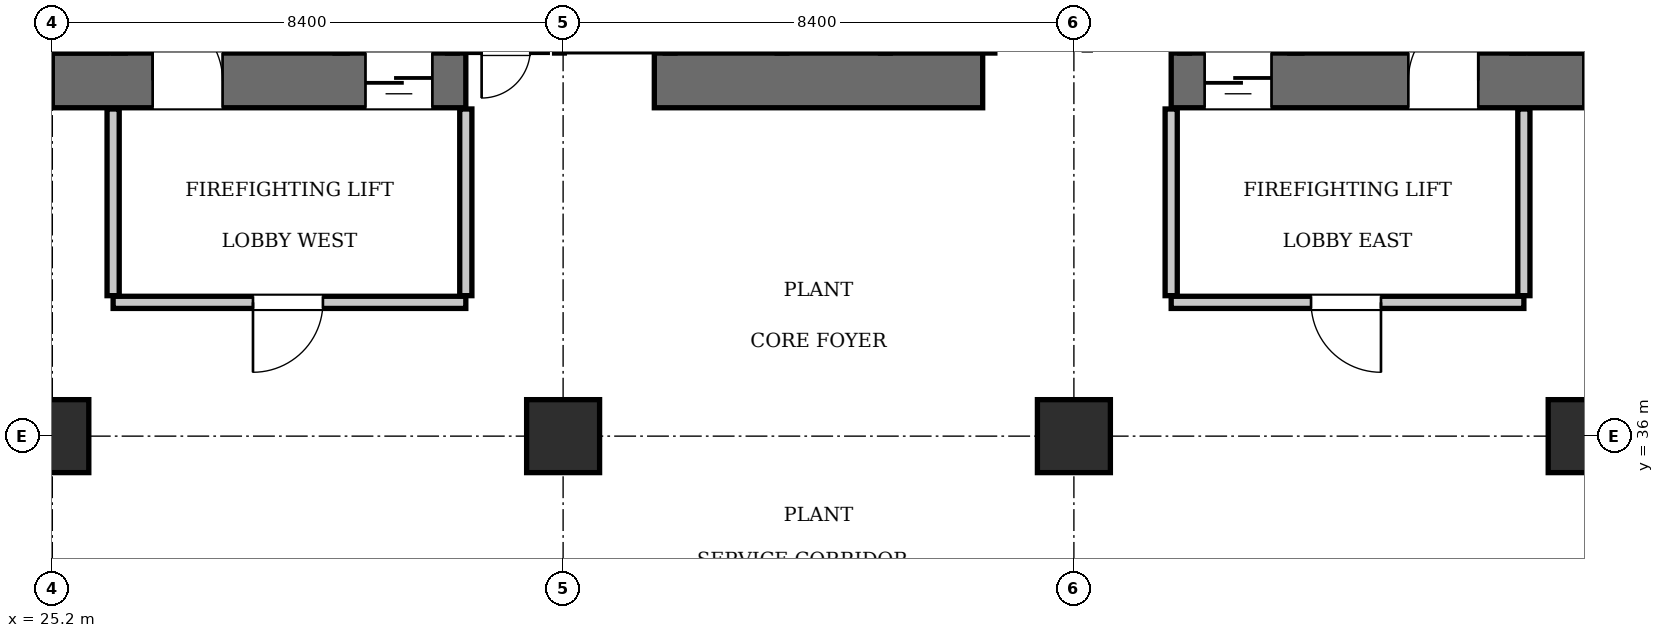
"""IFC4 building model, lengths in metres.
Left out: names, types, materials, properties, quantities, classifications, styles, units other than length and angle.
Written with IfcOpenShell. Run it as: python <this file> out.ifc"""

import sys

from ifc_helpers import new_model, si_unit, direction, frame, frame_2d, origin, origin_2d, place, context, subcontext, project, spatial, rectangle, extrude, element, fill, save


model = new_model("IFC4")
c1 = context("Model", 3, precision=1e-05, world=origin(), true_north=direction((0.0, 1.0)))
c2 = subcontext(c1, "Body", "Model", "MODEL_VIEW")
j1 = project(units=[si_unit("LENGTHUNIT", "METRE"), si_unit("PLANEANGLEUNIT", "RADIAN")], contexts=[c1])
p1 = place(None, origin())
s1 = spatial("IfcSite", under=j1, at=p1, CompositionType="ELEMENT")
p2 = place(p1, origin())
s2 = spatial("IfcBuilding", under=s1, at=p2, CompositionType="ELEMENT")
p3 = place(p2, frame((0.0, 0.0, 21.35)))
s3 = spatial("IfcBuildingStorey", under=s2, at=p3, CompositionType="ELEMENT", Elevation=21.35)
p4 = place(p3, frame((25.2, 41.85, 0.0), z_axis=(0.0, 0.0, 1.0), x_axis=(1.0, 0.0, 0.0)))
e1 = element("IfcWall", 1, at=p4, inside=s3, PredefinedType="SHEAR", context=c2, shape_type="SweptSolid", body=[
    extrude(rectangle(XDim=6.8, YDim=0.9, at=frame_2d((3.4, 0.0))), origin(), (0.0, 0.0, 1.0), 5.6),
])
p5 = place(p4, frame((1.65, 0.0, 0.0)))
e2 = element("IfcOpeningElement", 2, at=p5, cuts=e1, PredefinedType="OPENING", context=c2, shape_type="SweptSolid", body=[
    extrude(rectangle(XDim=1.15, YDim=2.15, at=frame_2d((0.575, 1.075))), frame((0.0, 0.46, 0.0), z_axis=(0.0, -1.0, 0.0), x_axis=(1.0, 0.0, 0.0)), (0.0, 0.0, 1.0), 0.92),
])
p6 = place(p4, frame((5.15, 0.0, 0.0)))
e3 = element("IfcOpeningElement", 3, at=p6, cuts=e1, PredefinedType="OPENING", context=c2, shape_type="SweptSolid", body=[
    extrude(rectangle(XDim=1.1, YDim=2.2, at=frame_2d((0.55, 1.1))), frame((0.0, 0.46, 0.0), z_axis=(0.0, -1.0, 0.0), x_axis=(1.0, 0.0, 0.0)), (0.0, 0.0, 1.0), 0.92),
])
p7 = place(p3, frame((35.1, 41.85, 0.0), z_axis=(0.0, 0.0, 1.0), x_axis=(1.0, 0.0, 0.0)))
e4 = element("IfcWall", 4, at=p7, inside=s3, PredefinedType="SHEAR", context=c2, shape_type="SweptSolid", body=[
    extrude(rectangle(XDim=5.4, YDim=0.9, at=frame_2d((2.7, 0.0))), origin(), (0.0, 0.0, 1.0), 5.6),
])
p8 = place(p3, frame((43.6, 41.85, 0.0), z_axis=(0.0, 0.0, 1.0), x_axis=(1.0, 0.0, 0.0)))
e5 = element("IfcWall", 5, at=p8, inside=s3, PredefinedType="SHEAR", context=c2, shape_type="SweptSolid", body=[
    extrude(rectangle(XDim=6.8, YDim=0.9, at=frame_2d((3.4, 0.0))), origin(), (0.0, 0.0, 1.0), 5.6),
])
p9 = place(p8, frame((3.9, 0.0, 0.0)))
e6 = element("IfcOpeningElement", 6, at=p9, cuts=e5, PredefinedType="OPENING", context=c2, shape_type="SweptSolid", body=[
    extrude(rectangle(XDim=1.15, YDim=2.15, at=frame_2d((0.575, 1.075))), frame((0.0, 0.46, 0.0), z_axis=(0.0, -1.0, 0.0), x_axis=(1.0, 0.0, 0.0)), (0.0, 0.0, 1.0), 0.92),
])
p10 = place(p8, frame((0.55, 0.0, 0.0)))
e7 = element("IfcOpeningElement", 7, at=p10, cuts=e5, PredefinedType="OPENING", context=c2, shape_type="SweptSolid", body=[
    extrude(rectangle(XDim=1.1, YDim=2.2, at=frame_2d((0.55, 1.1))), frame((0.0, 0.46, 0.0), z_axis=(0.0, -1.0, 0.0), x_axis=(1.0, 0.0, 0.0)), (0.0, 0.0, 1.0), 0.92),
])
for number, where, z_axis, x_axis in (
    (8, (25.65, 42.3, 0.0), (0.0, 0.0, 1.0), (0.0, 1.0, 0.0)),
    (9, (49.95, 42.3, 0.0), (0.0, 0.0, 1.0), (0.0, 1.0, 0.0)),
):
    element("IfcWall", number, at=place(p3, frame(where, z_axis=z_axis, x_axis=x_axis)), inside=s3, PredefinedType="SHEAR", context=c2, shape_type="SweptSolid", body=[
        extrude(rectangle(XDim=1.6, YDim=0.9, at=frame_2d((0.8, 0.0))), origin(), (0.0, 0.0, 1.0), 5.6),
    ])
for number, where, z_axis, x_axis in (
    (10, (25.2, 36.0, 0.0), (0.0, 0.0, 1.0), (1.0, 0.0, 0.0)),
    (11, (33.6, 36.0, 0.0), (0.0, 0.0, 1.0), (1.0, 0.0, 0.0)),
    (12, (42.0, 36.0, 0.0), (0.0, 0.0, 1.0), (1.0, 0.0, 0.0)),
    (13, (50.4, 36.0, 0.0), (0.0, 0.0, 1.0), (1.0, 0.0, 0.0)),
):
    element("IfcColumn", number, at=place(p3, frame(where, z_axis=z_axis, x_axis=x_axis)), inside=s3, PredefinedType="COLUMN", context=c2, shape_type="SweptSolid", body=[
        extrude(rectangle(XDim=1.2, YDim=1.2, at=origin_2d()), origin(), (0.0, 0.0, 1.0), 5.6),
    ])
p11 = place(p3, frame((29.95, 42.3, 0.0), z_axis=(0.0, 0.0, 1.0), x_axis=(0.0, 1.0, 0.0)))
e14 = element("IfcWall", 14, at=p11, inside=s3, PredefinedType="SOLIDWALL", context=c2, shape_type="SweptSolid", body=[
    extrude(rectangle(XDim=8.85, YDim=0.2, at=frame_2d((4.425, 0.0))), origin(), (0.0, 0.0, 1.0), 5.36),
])
p12 = place(p3, frame((26.3, 42.3, 0.0), z_axis=(0.0, 0.0, 1.0), x_axis=(0.0, 1.0, 0.0)))
e15 = element("IfcWall", 15, at=p12, inside=s3, PredefinedType="SOLIDWALL", context=c2, shape_type="SweptSolid", body=[
    extrude(rectangle(XDim=1.58, YDim=0.2, at=frame_2d((0.79, 0.0))), origin(), (0.0, 0.0, 1.0), 5.36),
])
p13 = place(p3, frame((45.65, 42.3, 0.0), z_axis=(0.0, 0.0, 1.0), x_axis=(0.0, 1.0, 0.0)))
e16 = element("IfcWall", 16, at=p13, inside=s3, PredefinedType="SOLIDWALL", context=c2, shape_type="SweptSolid", body=[
    extrude(rectangle(XDim=8.85, YDim=0.2, at=frame_2d((4.425, 0.0))), origin(), (0.0, 0.0, 1.0), 5.36),
])
p14 = place(p3, frame((49.3, 42.3, 0.0), z_axis=(0.0, 0.0, 1.0), x_axis=(0.0, 1.0, 0.0)))
e17 = element("IfcWall", 17, at=p14, inside=s3, PredefinedType="SOLIDWALL", context=c2, shape_type="SweptSolid", body=[
    extrude(rectangle(XDim=1.58, YDim=0.2, at=frame_2d((0.79, 0.0))), origin(), (0.0, 0.0, 1.0), 5.36),
])
for number, where, z_axis, x_axis in (
    (18, (31.78, 42.3, 0.0), (0.0, 0.0, 1.0), (0.0, 1.0, 0.0)),
    (19, (43.82, 42.3, 0.0), (0.0, 0.0, 1.0), (0.0, 1.0, 0.0)),
):
    element("IfcWall", number, at=place(p3, frame(where, z_axis=z_axis, x_axis=x_axis)), inside=s3, PredefinedType="SOLIDWALL", context=c2, shape_type="SweptSolid", body=[
        extrude(rectangle(XDim=2.44, YDim=0.16, at=frame_2d((1.22, 0.0))), origin(), (0.0, 0.0, 1.0), 5.36),
    ])
for number, where, z_axis, x_axis in (
    (20, (37.2, 42.3, 0.0), (0.0, 0.0, 1.0), (0.0, 1.0, 0.0)),
    (21, (38.9, 42.3, 0.0), (0.0, 0.0, 1.0), (0.0, 1.0, 0.0)),
    (22, (40.62, 42.3, 0.0), (0.0, 0.0, 1.0), (0.0, 1.0, 0.0)),
):
    element("IfcWall", number, at=place(p3, frame(where, z_axis=z_axis, x_axis=x_axis)), inside=s3, PredefinedType="SOLIDWALL", context=c2, shape_type="SweptSolid", body=[
        extrude(rectangle(XDim=2.05, YDim=0.16, at=frame_2d((1.025, 0.0))), origin(), (0.0, 0.0, 1.0), 5.36),
    ])
for number, where, z_axis, x_axis in (
    (23, (33.54, 42.3, 0.0), (0.0, 0.0, 1.0), (0.0, 1.0, 0.0)),
    (24, (35.36, 42.3, 0.0), (0.0, 0.0, 1.0), (0.0, 1.0, 0.0)),
):
    element("IfcWall", number, at=place(p3, frame(where, z_axis=z_axis, x_axis=x_axis)), inside=s3, PredefinedType="SOLIDWALL", context=c2, shape_type="SweptSolid", body=[
        extrude(rectangle(XDim=2.1, YDim=0.16, at=frame_2d((1.05, 0.0))), origin(), (0.0, 0.0, 1.0), 5.36),
    ])
p15 = place(p3, frame((33.62, 42.4, 0.0), z_axis=(0.0, 0.0, 1.0), x_axis=(1.0, 0.0, 0.0)))
e25 = element("IfcWall", 25, at=p15, inside=s3, PredefinedType="SOLIDWALL", context=c2, shape_type="SweptSolid", body=[
    extrude(rectangle(XDim=1.66, YDim=0.16, at=frame_2d((0.83, 0.0))), origin(), (0.0, 0.0, 1.0), 5.36),
])
p16 = place(p3, frame((26.2, 38.2, 0.0), z_axis=(0.0, 0.0, 1.0), x_axis=(1.0, 0.0, 0.0)))
e26 = element("IfcWall", 26, at=p16, inside=s3, PredefinedType="PARTITIONING", context=c2, shape_type="SweptSolid", body=[
    extrude(rectangle(XDim=5.8, YDim=0.2, at=frame_2d((2.9, 0.0))), origin(), (0.0, 0.0, 1.0), 5.36),
])
p17 = place(p16, frame((2.3, 0.0, 0.0)))
e27 = element("IfcOpeningElement", 27, at=p17, cuts=e26, PredefinedType="OPENING", context=c2, shape_type="SweptSolid", body=[
    extrude(rectangle(XDim=1.15, YDim=2.15, at=frame_2d((0.575, 1.075))), frame((0.0, 0.11, 0.0), z_axis=(0.0, -1.0, 0.0), x_axis=(1.0, 0.0, 0.0)), (0.0, 0.0, 1.0), 0.22),
])
for number, where, z_axis, x_axis in (
    (28, (26.2, 38.31, 0.0), (0.0, 0.0, 1.0), (0.0, 1.0, 0.0)),
    (29, (32.0, 38.31, 0.0), (0.0, 0.0, 1.0), (0.0, 1.0, 0.0)),
):
    element("IfcWall", number, at=place(p3, frame(where, z_axis=z_axis, x_axis=x_axis)), inside=s3, PredefinedType="PARTITIONING", context=c2, shape_type="SweptSolid", body=[
        extrude(rectangle(XDim=3.07, YDim=0.2, at=frame_2d((1.535, 0.0))), origin(), (0.0, 0.0, 1.0), 5.36),
    ])
p18 = place(p3, frame((43.6, 38.2, 0.0), z_axis=(0.0, 0.0, 1.0), x_axis=(1.0, 0.0, 0.0)))
e30 = element("IfcWall", 30, at=p18, inside=s3, PredefinedType="PARTITIONING", context=c2, shape_type="SweptSolid", body=[
    extrude(rectangle(XDim=5.8, YDim=0.2, at=frame_2d((2.9, 0.0))), origin(), (0.0, 0.0, 1.0), 5.36),
])
p19 = place(p18, frame((2.3, 0.0, 0.0)))
e31 = element("IfcOpeningElement", 31, at=p19, cuts=e30, PredefinedType="OPENING", context=c2, shape_type="SweptSolid", body=[
    extrude(rectangle(XDim=1.15, YDim=2.15, at=frame_2d((0.575, 1.075))), frame((0.0, 0.11, 0.0), z_axis=(0.0, -1.0, 0.0), x_axis=(1.0, 0.0, 0.0)), (0.0, 0.0, 1.0), 0.22),
])
for number, where, z_axis, x_axis in (
    (32, (43.6, 38.31, 0.0), (0.0, 0.0, 1.0), (0.0, 1.0, 0.0)),
    (33, (49.4, 38.31, 0.0), (0.0, 0.0, 1.0), (0.0, 1.0, 0.0)),
):
    element("IfcWall", number, at=place(p3, frame(where, z_axis=z_axis, x_axis=x_axis)), inside=s3, PredefinedType="PARTITIONING", context=c2, shape_type="SweptSolid", body=[
        extrude(rectangle(XDim=3.07, YDim=0.2, at=frame_2d((1.535, 0.0))), origin(), (0.0, 0.0, 1.0), 5.36),
    ])
p20 = place(p3, frame((32.02, 42.36, 0.0), z_axis=(0.0, 0.0, 1.0), x_axis=(1.0, 0.0, 0.0)))
e34 = element("IfcWall", 34, at=p20, inside=s3, PredefinedType="PARTITIONING", context=c2, shape_type="SweptSolid", body=[
    extrude(rectangle(XDim=1.32, YDim=0.1, at=frame_2d((0.66, 0.0))), origin(), (0.0, 0.0, 1.0), 5.36),
])
p21 = place(p20, frame((0.24, 0.0, 0.0)))
e35 = element("IfcOpeningElement", 35, at=p21, cuts=e34, PredefinedType="OPENING", context=c2, shape_type="SweptSolid", body=[
    extrude(rectangle(XDim=0.8, YDim=2.05, at=frame_2d((0.4, 1.025))), frame((0.0, 0.06, 0.0), z_axis=(0.0, -1.0, 0.0), x_axis=(1.0, 0.0, 0.0)), (0.0, 0.0, 1.0), 0.12),
])
p22 = place(p5, origin())
e36 = element("IfcDoor", 36, at=p22, inside=s3, OperationType="SINGLE_SWING_LEFT", PredefinedType="DOOR", context=c2, shape_type="SweptSolid", body=[
    extrude(rectangle(XDim=1.15, YDim=2.15, at=frame_2d((0.575, 1.075))), frame((0.0, 0.025, 0.0), z_axis=(0.0, -1.0, 0.0), x_axis=(1.0, 0.0, 0.0)), (0.0, 0.0, 1.0), 0.05),
])
fill(e2, e36)
p23 = place(p9, origin())
e37 = element("IfcDoor", 37, at=p23, inside=s3, OperationType="SINGLE_SWING_RIGHT", PredefinedType="DOOR", context=c2, shape_type="SweptSolid", body=[
    extrude(rectangle(XDim=1.15, YDim=2.15, at=frame_2d((0.575, 1.075))), frame((0.0, 0.025, 0.0), z_axis=(0.0, -1.0, 0.0), x_axis=(1.0, 0.0, 0.0)), (0.0, 0.0, 1.0), 0.05),
])
fill(e6, e37)
p24 = place(p6, frame((1.1, 0.0, 0.0), z_axis=(0.0, 0.0, 1.0), x_axis=(-1.0, 0.0, 0.0)))
e38 = element("IfcDoor", 38, at=p24, inside=s3, OperationType="SLIDING_TO_LEFT", PredefinedType="DOOR", context=c2, shape_type="SweptSolid", body=[
    extrude(rectangle(XDim=1.1, YDim=2.2, at=frame_2d((0.55, 1.1))), frame((0.0, 0.025, 0.0), z_axis=(0.0, -1.0, 0.0), x_axis=(1.0, 0.0, 0.0)), (0.0, 0.0, 1.0), 0.05),
])
fill(e3, e38)
p25 = place(p10, frame((1.1, 0.0, 0.0), z_axis=(0.0, 0.0, 1.0), x_axis=(-1.0, 0.0, 0.0)))
e39 = element("IfcDoor", 39, at=p25, inside=s3, OperationType="SLIDING_TO_LEFT", PredefinedType="DOOR", context=c2, shape_type="SweptSolid", body=[
    extrude(rectangle(XDim=1.1, YDim=2.2, at=frame_2d((0.55, 1.1))), frame((0.0, 0.025, 0.0), z_axis=(0.0, -1.0, 0.0), x_axis=(1.0, 0.0, 0.0)), (0.0, 0.0, 1.0), 0.05),
])
fill(e7, e39)
p26 = place(p17, frame((1.15, 0.0, 0.0), z_axis=(0.0, 0.0, 1.0), x_axis=(-1.0, 0.0, 0.0)))
e40 = element("IfcDoor", 40, at=p26, inside=s3, OperationType="SINGLE_SWING_RIGHT", PredefinedType="DOOR", context=c2, shape_type="SweptSolid", body=[
    extrude(rectangle(XDim=1.15, YDim=2.15, at=frame_2d((0.575, 1.075))), frame((0.0, 0.025, 0.0), z_axis=(0.0, -1.0, 0.0), x_axis=(1.0, 0.0, 0.0)), (0.0, 0.0, 1.0), 0.05),
])
fill(e27, e40)
p27 = place(p19, frame((1.15, 0.0, 0.0), z_axis=(0.0, 0.0, 1.0), x_axis=(-1.0, 0.0, 0.0)))
e41 = element("IfcDoor", 41, at=p27, inside=s3, OperationType="SINGLE_SWING_LEFT", PredefinedType="DOOR", context=c2, shape_type="SweptSolid", body=[
    extrude(rectangle(XDim=1.15, YDim=2.15, at=frame_2d((0.575, 1.075))), frame((0.0, 0.025, 0.0), z_axis=(0.0, -1.0, 0.0), x_axis=(1.0, 0.0, 0.0)), (0.0, 0.0, 1.0), 0.05),
])
fill(e31, e41)
save(model, sys.argv[1])
